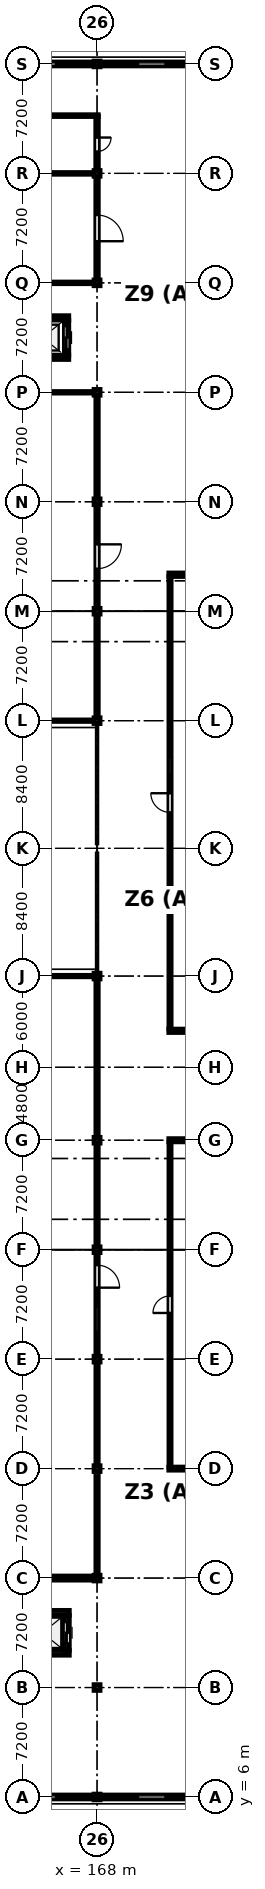
"""IFC4 building model, lengths in metres.
Left out: names, types, materials, properties, quantities, classifications, styles, units other than length and angle.
Written with IfcOpenShell. Run it as: python <this file> out.ifc"""

import sys

from ifc_helpers import new_model, si_unit, direction, frame, frame_2d, origin, origin_2d, place, context, subcontext, project, spatial, rectangle, i_section, extrude, element, fill, save


model = new_model("IFC4")
c1 = context("Model", 3, precision=1e-05, world=origin(), true_north=direction((0.0, 1.0)))
c2 = subcontext(c1, "Body", "Model", "MODEL_VIEW")
j1 = project(units=[si_unit("LENGTHUNIT", "METRE"), si_unit("PLANEANGLEUNIT", "RADIAN")], contexts=[c1])
p1 = place(None, origin())
s1 = spatial("IfcSite", under=j1, at=p1, CompositionType="ELEMENT")
p2 = place(p1, origin())
s2 = spatial("IfcBuilding", under=s1, at=p2, CompositionType="ELEMENT")
p3 = place(p2, origin())
s3 = spatial("IfcBuildingStorey", under=s2, at=p3, CompositionType="ELEMENT", Elevation=0.0)
for number, where, z_axis, x_axis in (
    (1, (168.0, 6.0, 0.0), (0.0, 0.0, 1.0), (1.0, 0.0, 0.0)),
    (2, (168.0, 13.2, 0.0), (0.0, 0.0, 1.0), (1.0, 0.0, 0.0)),
    (3, (168.0, 20.4, 0.0), (0.0, 0.0, 1.0), (1.0, 0.0, 0.0)),
    (4, (168.0, 27.6, 0.0), (0.0, 0.0, 1.0), (1.0, 0.0, 0.0)),
    (5, (168.0, 34.8, 0.0), (0.0, 0.0, 1.0), (1.0, 0.0, 0.0)),
    (6, (168.0, 42.0, 0.0), (0.0, 0.0, 1.0), (1.0, 0.0, 0.0)),
    (7, (168.0, 49.2, 0.0), (0.0, 0.0, 1.0), (1.0, 0.0, 0.0)),
    (8, (168.0, 60.0, 0.0), (0.0, 0.0, 1.0), (1.0, 0.0, 0.0)),
    (9, (168.0, 76.8, 0.0), (0.0, 0.0, 1.0), (1.0, 0.0, 0.0)),
    (10, (168.0, 84.0, 0.0), (0.0, 0.0, 1.0), (1.0, 0.0, 0.0)),
    (11, (168.0, 91.2, 0.0), (0.0, 0.0, 1.0), (1.0, 0.0, 0.0)),
    (12, (168.0, 98.4, 0.0), (0.0, 0.0, 1.0), (1.0, 0.0, 0.0)),
    (13, (168.0, 105.6, 0.0), (0.0, 0.0, 1.0), (1.0, 0.0, 0.0)),
    (14, (168.0, 112.8, 0.0), (0.0, 0.0, 1.0), (1.0, 0.0, 0.0)),
    (15, (168.0, 120.0, 0.0), (0.0, 0.0, 1.0), (1.0, 0.0, 0.0)),
):
    element("IfcColumn", number, at=place(p3, frame(where, z_axis=z_axis, x_axis=x_axis)), inside=s3, PredefinedType="COLUMN", context=c2, shape_type="SweptSolid", body=[
        extrude(i_section(OverallWidth=0.396, OverallDepth=0.381, WebThickness=0.019, FlangeThickness=0.03, FilletRadius=0.015, at=origin_2d()), origin(), (0.0, 0.0, 1.0), 5.4),
    ])
p4 = place(p3, frame((167.795, 6.0, 0.0), z_axis=(0.0, 0.0, 1.0), x_axis=(-1.0, 0.0, 0.0)))
e16 = element("IfcWall", 16, at=p4, inside=s3, PredefinedType="STANDARD", context=c2, shape_type="SweptSolid", body=[
    extrude(rectangle(XDim=6.79, YDim=0.26, at=frame_2d((3.395, 0.0))), origin(), (0.0, 0.0, 1.0), 4.442),
])
p5 = place(p4, frame((2.495, 0.0, 0.9)))
e17 = element("IfcOpeningElement", 17, at=p5, cuts=e16, PredefinedType="OPENING", context=c2, shape_type="SweptSolid", body=[
    extrude(rectangle(XDim=1.8, YDim=1.5, at=frame_2d((0.9, 0.75))), frame((0.0, 0.14, 0.0), z_axis=(0.0, -1.0, 0.0), x_axis=(1.0, 0.0, 0.0)), (0.0, 0.0, 1.0), 0.28),
])
p6 = place(p3, frame((161.005, 120.0, 0.0), z_axis=(0.0, 0.0, 1.0), x_axis=(1.0, 0.0, 0.0)))
e18 = element("IfcWall", 18, at=p6, inside=s3, PredefinedType="STANDARD", context=c2, shape_type="SweptSolid", body=[
    extrude(rectangle(XDim=6.79, YDim=0.26, at=frame_2d((3.395, 0.0))), origin(), (0.0, 0.0, 1.0), 4.442),
])
p7 = place(p6, frame((2.495, 0.0, 0.9)))
e19 = element("IfcOpeningElement", 19, at=p7, cuts=e18, PredefinedType="OPENING", context=c2, shape_type="SweptSolid", body=[
    extrude(rectangle(XDim=1.8, YDim=1.5, at=frame_2d((0.9, 0.75))), frame((0.0, 0.14, 0.0), z_axis=(0.0, -1.0, 0.0), x_axis=(1.0, 0.0, 0.0)), (0.0, 0.0, 1.0), 0.28),
])
p8 = place(p3, frame((174.995, 6.0, 0.0), z_axis=(0.0, 0.0, 1.0), x_axis=(-1.0, 0.0, 0.0)))
e20 = element("IfcWall", 20, at=p8, inside=s3, PredefinedType="STANDARD", context=c2, shape_type="SweptSolid", body=[
    extrude(rectangle(XDim=6.79, YDim=0.26, at=frame_2d((3.395, 0.0))), origin(), (0.0, 0.0, 1.0), 4.442),
])
p9 = place(p8, frame((2.495, 0.0, 0.9)))
e21 = element("IfcOpeningElement", 21, at=p9, cuts=e20, PredefinedType="OPENING", context=c2, shape_type="SweptSolid", body=[
    extrude(rectangle(XDim=1.8, YDim=1.5, at=frame_2d((0.9, 0.75))), frame((0.0, 0.14, 0.0), z_axis=(0.0, -1.0, 0.0), x_axis=(1.0, 0.0, 0.0)), (0.0, 0.0, 1.0), 0.28),
])
p10 = place(p3, frame((168.205, 120.0, 0.0), z_axis=(0.0, 0.0, 1.0), x_axis=(1.0, 0.0, 0.0)))
e22 = element("IfcWall", 22, at=p10, inside=s3, PredefinedType="STANDARD", context=c2, shape_type="SweptSolid", body=[
    extrude(rectangle(XDim=6.79, YDim=0.26, at=frame_2d((3.395, 0.0))), origin(), (0.0, 0.0, 1.0), 4.442),
])
p11 = place(p10, frame((2.495, 0.0, 0.9)))
e23 = element("IfcOpeningElement", 23, at=p11, cuts=e22, PredefinedType="OPENING", context=c2, shape_type="SweptSolid", body=[
    extrude(rectangle(XDim=1.8, YDim=1.5, at=frame_2d((0.9, 0.75))), frame((0.0, 0.14, 0.0), z_axis=(0.0, -1.0, 0.0), x_axis=(1.0, 0.0, 0.0)), (0.0, 0.0, 1.0), 0.28),
])
for number, where, z_axis, x_axis in (
    (24, (166.175, 15.488, 0.0), (0.0, 0.0, 1.0), (-1.0, 0.0, 0.0)),
    (25, (162.625, 18.112, 0.0), (0.0, 0.0, 1.0), (1.0, 0.0, 0.0)),
):
    element("IfcWall", number, at=place(p3, frame(where, z_axis=z_axis, x_axis=x_axis)), inside=s3, PredefinedType="SHEAR", context=c2, shape_type="SweptSolid", body=[
        extrude(rectangle(XDim=3.55, YDim=0.325, at=frame_2d((1.775, 0.0))), origin(), (0.0, 0.0, 1.0), 5.14),
    ])
p12 = place(p3, frame((166.012, 17.95, 0.0), z_axis=(0.0, 0.0, 1.0), x_axis=(0.0, -1.0, 0.0)))
e26 = element("IfcWall", 26, at=p12, inside=s3, PredefinedType="SHEAR", context=c2, shape_type="SweptSolid", body=[
    extrude(rectangle(XDim=2.3, YDim=0.325, at=frame_2d((1.15, 0.0))), origin(), (0.0, 0.0, 1.0), 5.14),
])
p13 = place(p12, frame((0.45, 0.0, 0.0)))
e27 = element("IfcOpeningElement", 27, at=p13, cuts=e26, PredefinedType="OPENING", context=c2, shape_type="SweptSolid", body=[
    extrude(rectangle(XDim=1.4, YDim=2.3, at=frame_2d((0.7, 1.15))), frame((0.0, 0.172, 0.0), z_axis=(0.0, -1.0, 0.0), x_axis=(1.0, 0.0, 0.0)), (0.0, 0.0, 1.0), 0.345),
])
for number, where, z_axis, x_axis in (
    (28, (166.14, 100.705, 0.0), (0.0, 0.0, 1.0), (-1.0, 0.0, 0.0)),
    (29, (162.66, 103.295, 0.0), (0.0, 0.0, 1.0), (1.0, 0.0, 0.0)),
):
    element("IfcWall", number, at=place(p3, frame(where, z_axis=z_axis, x_axis=x_axis)), inside=s3, PredefinedType="SHEAR", context=c2, shape_type="SweptSolid", body=[
        extrude(rectangle(XDim=3.48, YDim=0.29, at=frame_2d((1.74, 0.0))), origin(), (0.0, 0.0, 1.0), 5.14),
    ])
p14 = place(p3, frame((165.995, 103.15, 0.0), z_axis=(0.0, 0.0, 1.0), x_axis=(0.0, -1.0, 0.0)))
e30 = element("IfcWall", 30, at=p14, inside=s3, PredefinedType="SHEAR", context=c2, shape_type="SweptSolid", body=[
    extrude(rectangle(XDim=2.3, YDim=0.29, at=frame_2d((1.15, 0.0))), origin(), (0.0, 0.0, 1.0), 5.14),
])
p15 = place(p14, frame((0.4, 0.0, 0.0)))
e31 = element("IfcOpeningElement", 31, at=p15, cuts=e30, PredefinedType="OPENING", context=c2, shape_type="SweptSolid", body=[
    extrude(rectangle(XDim=1.5, YDim=2.3, at=frame_2d((0.75, 1.15))), frame((0.0, 0.155, 0.0), z_axis=(0.0, -1.0, 0.0), x_axis=(1.0, 0.0, 0.0)), (0.0, 0.0, 1.0), 0.31),
])
p16 = place(p3, frame((176.718, 27.6, 0.0), z_axis=(0.0, 0.0, 1.0), x_axis=(-1.0, 0.0, 0.0)))
e32 = element("IfcWall", 32, at=p16, inside=s3, PredefinedType="PARTITIONING", context=c2, shape_type="SweptSolid", body=[
    extrude(rectangle(XDim=3.998, YDim=0.205, at=frame_2d((1.999, 0.0))), origin(), (0.0, 0.0, 1.0), 4.437),
])
p17 = place(p3, frame((172.72, 49.2, 0.0), z_axis=(0.0, 0.0, 1.0), x_axis=(1.0, 0.0, 0.0)))
e33 = element("IfcWall", 33, at=p17, inside=s3, PredefinedType="PARTITIONING", context=c2, shape_type="SweptSolid", body=[
    extrude(rectangle(XDim=31.148, YDim=0.212, at=frame_2d((15.574, 0.0))), origin(), (0.0, 0.0, 1.0), 4.437),
])
p18 = place(p3, frame((203.868, 56.4, 0.0), z_axis=(0.0, 0.0, 1.0), x_axis=(-1.0, 0.0, 0.0)))
e34 = element("IfcWall", 34, at=p18, inside=s3, PredefinedType="PARTITIONING", context=c2, shape_type="SweptSolid", body=[
    extrude(rectangle(XDim=31.148, YDim=0.225, at=frame_2d((15.574, 0.0))), origin(), (0.0, 0.0, 1.0), 4.437),
])
p19 = place(p3, frame((172.72, 86.4, 0.0), z_axis=(0.0, 0.0, 1.0), x_axis=(1.0, 0.0, 0.0)))
e35 = element("IfcWall", 35, at=p19, inside=s3, PredefinedType="PARTITIONING", context=c2, shape_type="SweptSolid", body=[
    extrude(rectangle(XDim=31.148, YDim=0.235, at=frame_2d((15.574, 0.0))), origin(), (0.0, 0.0, 1.0), 4.437),
])
p20 = place(p3, frame((168.08, 20.4, 0.0), z_axis=(0.0, 0.0, 1.0), x_axis=(-1.0, 0.0, 0.0)))
e36 = element("IfcWall", 36, at=p20, inside=s3, PredefinedType="PARTITIONING", context=c2, shape_type="SweptSolid", body=[
    extrude(rectangle(XDim=14.348, YDim=0.27, at=frame_2d((7.174, 0.0))), origin(), (0.0, 0.0, 1.0), 4.437),
])
p21 = place(p3, frame((153.732, 60.0, 0.0), z_axis=(0.0, 0.0, 1.0), x_axis=(1.0, 0.0, 0.0)))
e37 = element("IfcWall", 37, at=p21, inside=s3, PredefinedType="PARTITIONING", context=c2, shape_type="SweptSolid", body=[
    extrude(rectangle(XDim=14.348, YDim=0.095, at=frame_2d((7.174, 0.0))), origin(), (0.0, 0.0, 1.0), 4.437),
])
p22 = place(p3, frame((168.08, 76.8, 0.0), z_axis=(0.0, 0.0, 1.0), x_axis=(-1.0, 0.0, 0.0)))
e38 = element("IfcWall", 38, at=p22, inside=s3, PredefinedType="PARTITIONING", context=c2, shape_type="SweptSolid", body=[
    extrude(rectangle(XDim=14.348, YDim=0.1, at=frame_2d((7.174, 0.0))), origin(), (0.0, 0.0, 1.0), 4.437),
])
p23 = place(p3, frame((153.732, 98.4, 0.0), z_axis=(0.0, 0.0, 1.0), x_axis=(1.0, 0.0, 0.0)))
e39 = element("IfcWall", 39, at=p23, inside=s3, PredefinedType="PARTITIONING", context=c2, shape_type="SweptSolid", body=[
    extrude(rectangle(XDim=14.348, YDim=0.105, at=frame_2d((7.174, 0.0))), origin(), (0.0, 0.0, 1.0), 4.437),
])
p24 = place(p3, frame((168.08, 105.6, 0.0), z_axis=(0.0, 0.0, 1.0), x_axis=(-1.0, 0.0, 0.0)))
e40 = element("IfcWall", 40, at=p24, inside=s3, PredefinedType="PARTITIONING", context=c2, shape_type="SweptSolid", body=[
    extrude(rectangle(XDim=7.36, YDim=0.11, at=frame_2d((3.68, 0.0))), origin(), (0.0, 0.0, 1.0), 4.437),
])
p25 = place(p3, frame((160.895, 112.8, 0.0), z_axis=(0.0, 0.0, 1.0), x_axis=(1.0, 0.0, 0.0)))
e41 = element("IfcWall", 41, at=p25, inside=s3, PredefinedType="PARTITIONING", context=c2, shape_type="SweptSolid", body=[
    extrude(rectangle(XDim=7.185, YDim=0.115, at=frame_2d((3.593, 0.0))), origin(), (0.0, 0.0, 1.0), 4.437),
])
p26 = place(p3, frame((160.895, 116.6, 0.0), z_axis=(0.0, 0.0, 1.0), x_axis=(1.0, 0.0, 0.0)))
e42 = element("IfcWall", 42, at=p26, inside=s3, PredefinedType="PARTITIONING", context=c2, shape_type="SweptSolid", body=[
    extrude(rectangle(XDim=7.185, YDim=0.12, at=frame_2d((3.593, 0.0))), origin(), (0.0, 0.0, 1.0), 4.437),
])
p27 = place(p3, frame((172.8, 27.705, 0.0), z_axis=(0.0, 0.0, 1.0), x_axis=(0.0, 1.0, 0.0)))
e43 = element("IfcWall", 43, at=p27, inside=s3, PredefinedType="PARTITIONING", context=c2, shape_type="SweptSolid", body=[
    extrude(rectangle(XDim=21.387, YDim=0.14, at=frame_2d((10.693, 0.0))), origin(), (0.0, 0.0, 1.0), 4.437),
])
p28 = place(p27, frame((10.134, 0.0, 0.0)))
e44 = element("IfcOpeningElement", 44, at=p28, cuts=e43, PredefinedType="OPENING", context=c2, shape_type="SweptSolid", body=[
    extrude(rectangle(XDim=1.12, YDim=2.22, at=frame_2d((0.56, 1.11))), frame((0.0, 0.08, 0.0), z_axis=(0.0, -1.0, 0.0), x_axis=(1.0, 0.0, 0.0)), (0.0, 0.0, 1.0), 0.16),
])
p29 = place(p3, frame((172.8, 56.514, 0.0), z_axis=(0.0, 0.0, 1.0), x_axis=(0.0, 1.0, 0.0)))
e45 = element("IfcWall", 45, at=p29, inside=s3, PredefinedType="PARTITIONING", context=c2, shape_type="SweptSolid", body=[
    extrude(rectangle(XDim=29.766, YDim=0.145, at=frame_2d((14.883, 0.0))), origin(), (0.0, 0.0, 1.0), 4.437),
])
p30 = place(p29, frame((14.253, 0.0, 0.0)))
e46 = element("IfcOpeningElement", 46, at=p30, cuts=e45, PredefinedType="OPENING", context=c2, shape_type="SweptSolid", body=[
    extrude(rectangle(XDim=1.26, YDim=2.22, at=frame_2d((0.63, 1.11))), frame((0.0, 0.083, 0.0), z_axis=(0.0, -1.0, 0.0), x_axis=(1.0, 0.0, 0.0)), (0.0, 0.0, 1.0), 0.165),
])
p31 = place(p29, frame((16.763, 0.0, 0.95)))
e47 = element("IfcOpeningElement", 47, at=p31, cuts=e45, PredefinedType="OPENING", context=c2, shape_type="SweptSolid", body=[
    extrude(rectangle(XDim=1.1, YDim=1.3, at=frame_2d((0.55, 0.65))), frame((0.0, 0.083, 0.0), z_axis=(0.0, -1.0, 0.0), x_axis=(1.0, 0.0, 0.0)), (0.0, 0.0, 1.0), 0.165),
])
p32 = place(p3, frame((168.0, 59.95, 0.0), z_axis=(0.0, 0.0, 1.0), x_axis=(0.0, -1.0, 0.0)))
e48 = element("IfcWall", 48, at=p32, inside=s3, PredefinedType="PARTITIONING", context=c2, shape_type="SweptSolid", body=[
    extrude(rectangle(XDim=39.413, YDim=0.155, at=frame_2d((19.707, 0.0))), origin(), (0.0, 0.0, 1.0), 4.437),
])
p33 = place(p32, frame((18.967, 0.0, 0.0)))
e49 = element("IfcOpeningElement", 49, at=p33, cuts=e48, PredefinedType="OPENING", context=c2, shape_type="SweptSolid", body=[
    extrude(rectangle(XDim=1.48, YDim=2.22, at=frame_2d((0.74, 1.11))), frame((0.0, 0.087, 0.0), z_axis=(0.0, -1.0, 0.0), x_axis=(1.0, 0.0, 0.0)), (0.0, 0.0, 1.0), 0.175),
])
p34 = place(p32, frame((21.697, 0.0, 0.95)))
e50 = element("IfcOpeningElement", 50, at=p34, cuts=e48, PredefinedType="OPENING", context=c2, shape_type="SweptSolid", body=[
    extrude(rectangle(XDim=1.65, YDim=1.3, at=frame_2d((0.825, 0.65))), frame((0.0, 0.087, 0.0), z_axis=(0.0, -1.0, 0.0), x_axis=(1.0, 0.0, 0.0)), (0.0, 0.0, 1.0), 0.175),
])
p35 = place(p3, frame((168.0, 98.346, 0.0), z_axis=(0.0, 0.0, 1.0), x_axis=(0.0, -1.0, 0.0)))
e51 = element("IfcWall", 51, at=p35, inside=s3, PredefinedType="PARTITIONING", context=c2, shape_type="SweptSolid", body=[
    extrude(rectangle(XDim=21.494, YDim=0.16, at=frame_2d((10.747, 0.0))), origin(), (0.0, 0.0, 1.0), 4.437),
])
p36 = place(p35, frame((9.947, 0.0, 0.0)))
e52 = element("IfcOpeningElement", 52, at=p36, cuts=e51, PredefinedType="OPENING", context=c2, shape_type="SweptSolid", body=[
    extrude(rectangle(XDim=1.6, YDim=2.22, at=frame_2d((0.8, 1.11))), frame((0.0, 0.09, 0.0), z_axis=(0.0, -1.0, 0.0), x_axis=(1.0, 0.0, 0.0)), (0.0, 0.0, 1.0), 0.18),
])
p37 = place(p3, frame((168.0, 112.74, 0.0), z_axis=(0.0, 0.0, 1.0), x_axis=(0.0, -1.0, 0.0)))
e53 = element("IfcWall", 53, at=p37, inside=s3, PredefinedType="PARTITIONING", context=c2, shape_type="SweptSolid", body=[
    extrude(rectangle(XDim=7.083, YDim=0.165, at=frame_2d((3.542, 0.0))), origin(), (0.0, 0.0, 1.0), 4.437),
])
p38 = place(p37, frame((2.681, 0.0, 0.0)))
e54 = element("IfcOpeningElement", 54, at=p38, cuts=e53, PredefinedType="OPENING", context=c2, shape_type="SweptSolid", body=[
    extrude(rectangle(XDim=1.72, YDim=2.22, at=frame_2d((0.86, 1.11))), frame((0.0, 0.093, 0.0), z_axis=(0.0, -1.0, 0.0), x_axis=(1.0, 0.0, 0.0)), (0.0, 0.0, 1.0), 0.185),
])
p39 = place(p3, frame((168.0, 116.538, 0.0), z_axis=(0.0, 0.0, 1.0), x_axis=(0.0, -1.0, 0.0)))
e55 = element("IfcWall", 55, at=p39, inside=s3, PredefinedType="PARTITIONING", context=c2, shape_type="SweptSolid", body=[
    extrude(rectangle(XDim=3.678, YDim=0.17, at=frame_2d((1.839, 0.0))), origin(), (0.0, 0.0, 1.0), 4.437),
])
p40 = place(p39, frame((1.379, 0.0, 0.0)))
e56 = element("IfcOpeningElement", 56, at=p40, cuts=e55, PredefinedType="OPENING", context=c2, shape_type="SweptSolid", body=[
    extrude(rectangle(XDim=0.92, YDim=2.28, at=frame_2d((0.46, 1.14))), frame((0.0, 0.095, 0.0), z_axis=(0.0, -1.0, 0.0), x_axis=(1.0, 0.0, 0.0)), (0.0, 0.0, 1.0), 0.19),
])
p41 = place(p5, origin())
e57 = element("IfcWindow", 57, at=p41, inside=s3, PartitioningType="SINGLE_PANEL", PredefinedType="WINDOW", context=c2, shape_type="SweptSolid", body=[
    extrude(rectangle(XDim=1.8, YDim=1.5, at=frame_2d((0.9, 0.75))), frame((0.0, 0.03, 0.0), z_axis=(0.0, -1.0, 0.0), x_axis=(1.0, 0.0, 0.0)), (0.0, 0.0, 1.0), 0.06),
])
fill(e17, e57)
p42 = place(p7, origin())
e58 = element("IfcWindow", 58, at=p42, inside=s3, PartitioningType="SINGLE_PANEL", PredefinedType="WINDOW", context=c2, shape_type="SweptSolid", body=[
    extrude(rectangle(XDim=1.8, YDim=1.5, at=frame_2d((0.9, 0.75))), frame((0.0, 0.03, 0.0), z_axis=(0.0, -1.0, 0.0), x_axis=(1.0, 0.0, 0.0)), (0.0, 0.0, 1.0), 0.06),
])
fill(e19, e58)
p43 = place(p9, origin())
e59 = element("IfcWindow", 59, at=p43, inside=s3, PartitioningType="SINGLE_PANEL", PredefinedType="WINDOW", context=c2, shape_type="SweptSolid", body=[
    extrude(rectangle(XDim=1.8, YDim=1.5, at=frame_2d((0.9, 0.75))), frame((0.0, 0.03, 0.0), z_axis=(0.0, -1.0, 0.0), x_axis=(1.0, 0.0, 0.0)), (0.0, 0.0, 1.0), 0.06),
])
fill(e21, e59)
p44 = place(p11, origin())
e60 = element("IfcWindow", 60, at=p44, inside=s3, PartitioningType="SINGLE_PANEL", PredefinedType="WINDOW", context=c2, shape_type="SweptSolid", body=[
    extrude(rectangle(XDim=1.8, YDim=1.5, at=frame_2d((0.9, 0.75))), frame((0.0, 0.03, 0.0), z_axis=(0.0, -1.0, 0.0), x_axis=(1.0, 0.0, 0.0)), (0.0, 0.0, 1.0), 0.06),
])
fill(e23, e60)
p45 = place(p13, origin())
e61 = element("IfcDoor", 61, at=p45, inside=s3, OperationType="DOUBLE_DOOR_SLIDING", PredefinedType="DOOR", context=c2, shape_type="SweptSolid", body=[
    extrude(rectangle(XDim=1.4, YDim=2.3, at=frame_2d((0.7, 1.15))), frame((0.0, 0.025, 0.0), z_axis=(0.0, -1.0, 0.0), x_axis=(1.0, 0.0, 0.0)), (0.0, 0.0, 1.0), 0.05),
])
fill(e27, e61)
p46 = place(p15, origin())
e62 = element("IfcDoor", 62, at=p46, inside=s3, OperationType="DOUBLE_DOOR_SLIDING", PredefinedType="DOOR", context=c2, shape_type="SweptSolid", body=[
    extrude(rectangle(XDim=1.5, YDim=2.3, at=frame_2d((0.75, 1.15))), frame((0.0, 0.025, 0.0), z_axis=(0.0, -1.0, 0.0), x_axis=(1.0, 0.0, 0.0)), (0.0, 0.0, 1.0), 0.05),
])
fill(e31, e62)
p47 = place(p28, origin())
e63 = element("IfcDoor", 63, at=p47, inside=s3, OperationType="SINGLE_SWING_LEFT", PredefinedType="DOOR", context=c2, shape_type="SweptSolid", body=[
    extrude(rectangle(XDim=1.12, YDim=2.22, at=frame_2d((0.56, 1.11))), frame((0.0, 0.025, 0.0), z_axis=(0.0, -1.0, 0.0), x_axis=(1.0, 0.0, 0.0)), (0.0, 0.0, 1.0), 0.05),
])
fill(e44, e63)
p48 = place(p30, origin())
e64 = element("IfcDoor", 64, at=p48, inside=s3, OperationType="SINGLE_SWING_RIGHT", PredefinedType="DOOR", context=c2, shape_type="SweptSolid", body=[
    extrude(rectangle(XDim=1.26, YDim=2.22, at=frame_2d((0.63, 1.11))), frame((0.0, 0.025, 0.0), z_axis=(0.0, -1.0, 0.0), x_axis=(1.0, 0.0, 0.0)), (0.0, 0.0, 1.0), 0.05),
])
fill(e46, e64)
p49 = place(p31, origin())
e65 = element("IfcWindow", 65, at=p49, inside=s3, PartitioningType="SINGLE_PANEL", PredefinedType="WINDOW", context=c2, shape_type="SweptSolid", body=[
    extrude(rectangle(XDim=1.1, YDim=1.3, at=frame_2d((0.55, 0.65))), frame((0.0, 0.03, 0.0), z_axis=(0.0, -1.0, 0.0), x_axis=(1.0, 0.0, 0.0)), (0.0, 0.0, 1.0), 0.06),
])
fill(e47, e65)
p50 = place(p33, origin())
e66 = element("IfcDoor", 66, at=p50, inside=s3, OperationType="SINGLE_SWING_RIGHT", PredefinedType="DOOR", context=c2, shape_type="SweptSolid", body=[
    extrude(rectangle(XDim=1.48, YDim=2.22, at=frame_2d((0.74, 1.11))), frame((0.0, 0.025, 0.0), z_axis=(0.0, -1.0, 0.0), x_axis=(1.0, 0.0, 0.0)), (0.0, 0.0, 1.0), 0.05),
])
fill(e49, e66)
p51 = place(p34, origin())
e67 = element("IfcWindow", 67, at=p51, inside=s3, PartitioningType="SINGLE_PANEL", PredefinedType="WINDOW", context=c2, shape_type="SweptSolid", body=[
    extrude(rectangle(XDim=1.65, YDim=1.3, at=frame_2d((0.825, 0.65))), frame((0.0, 0.03, 0.0), z_axis=(0.0, -1.0, 0.0), x_axis=(1.0, 0.0, 0.0)), (0.0, 0.0, 1.0), 0.06),
])
fill(e50, e67)
p52 = place(p36, origin())
e68 = element("IfcDoor", 68, at=p52, inside=s3, OperationType="SINGLE_SWING_LEFT", PredefinedType="DOOR", context=c2, shape_type="SweptSolid", body=[
    extrude(rectangle(XDim=1.6, YDim=2.22, at=frame_2d((0.8, 1.11))), frame((0.0, 0.025, 0.0), z_axis=(0.0, -1.0, 0.0), x_axis=(1.0, 0.0, 0.0)), (0.0, 0.0, 1.0), 0.05),
])
fill(e52, e68)
p53 = place(p38, origin())
e69 = element("IfcDoor", 69, at=p53, inside=s3, OperationType="SINGLE_SWING_RIGHT", PredefinedType="DOOR", context=c2, shape_type="SweptSolid", body=[
    extrude(rectangle(XDim=1.72, YDim=2.22, at=frame_2d((0.86, 1.11))), frame((0.0, 0.025, 0.0), z_axis=(0.0, -1.0, 0.0), x_axis=(1.0, 0.0, 0.0)), (0.0, 0.0, 1.0), 0.05),
])
fill(e54, e69)
p54 = place(p40, origin())
e70 = element("IfcDoor", 70, at=p54, inside=s3, OperationType="SINGLE_SWING_LEFT", PredefinedType="DOOR", context=c2, shape_type="SweptSolid", body=[
    extrude(rectangle(XDim=0.92, YDim=2.28, at=frame_2d((0.46, 1.14))), frame((0.0, 0.025, 0.0), z_axis=(0.0, -1.0, 0.0), x_axis=(1.0, 0.0, 0.0)), (0.0, 0.0, 1.0), 0.05),
])
fill(e56, e70)
save(model, sys.argv[1])
